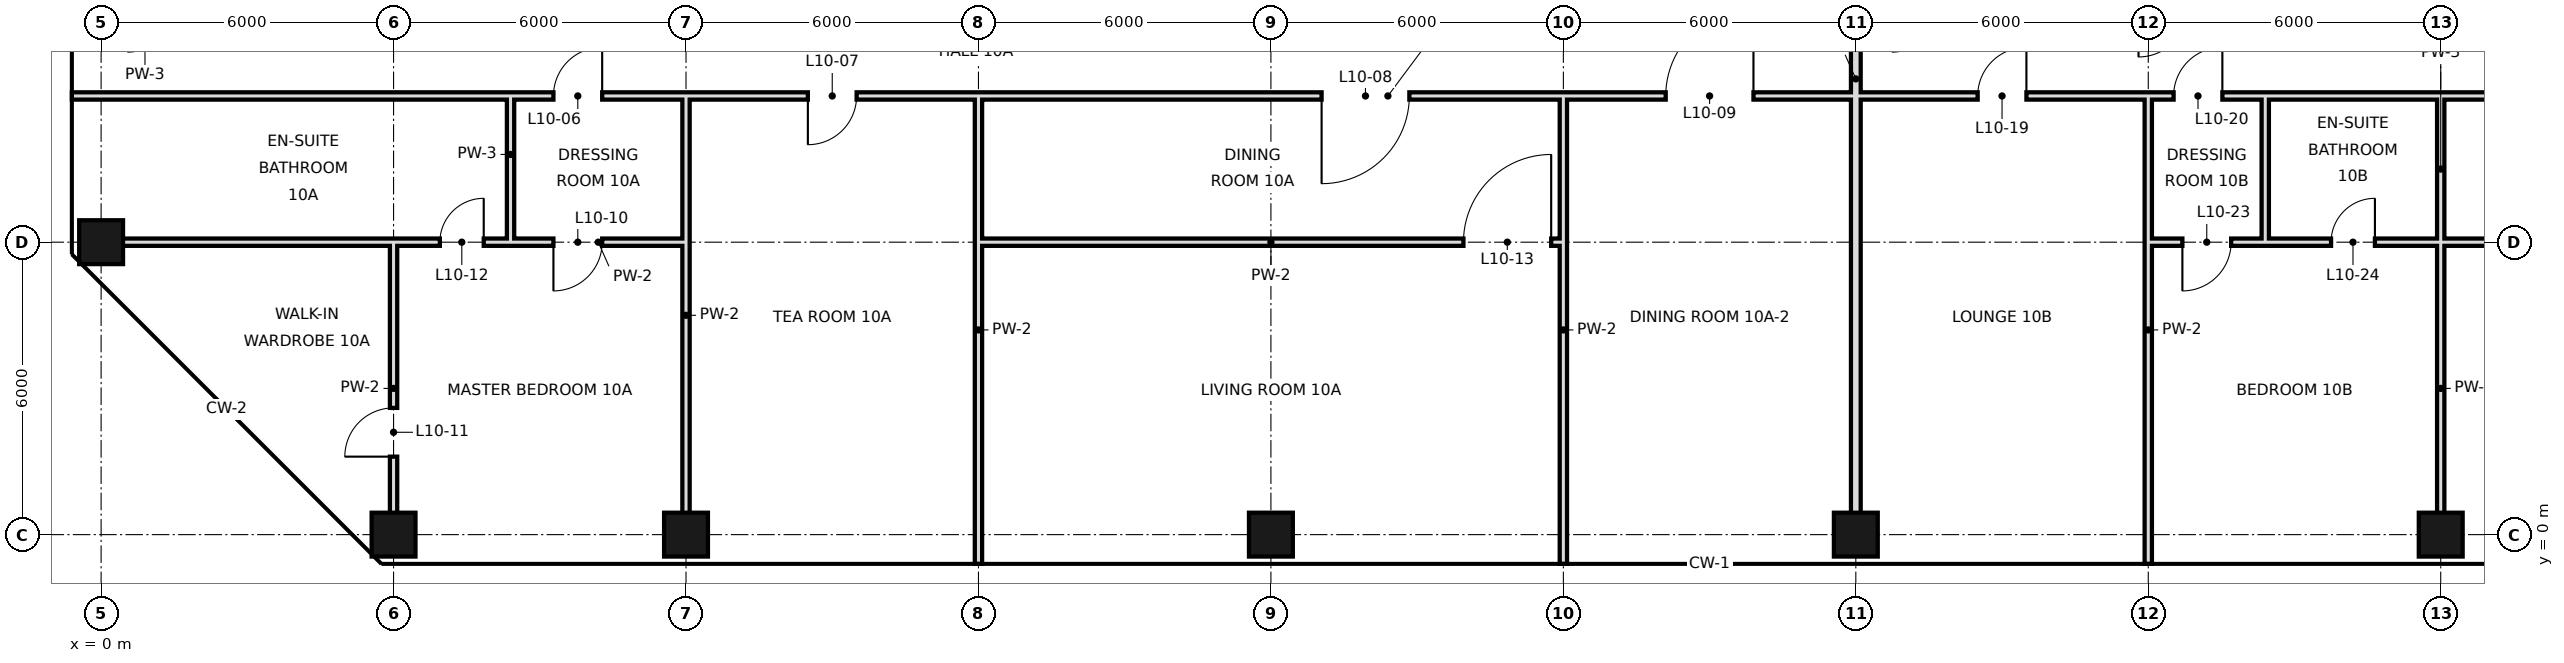
"""IFC4 building model, lengths in metres.
Left out: names, types, materials, properties, quantities, classifications, styles, units other than length and angle.
Written with IfcOpenShell. Run it as: python <this file> out.ifc"""

import sys

from ifc_helpers import new_model, si_unit, direction, frame, frame_2d, origin, origin_2d, place, context, subcontext, project, spatial, rectangle, hollow_rectangle, extrude, element, fill, save


model = new_model("IFC4")
c1 = context("Model", 3, precision=1e-05, world=origin(), true_north=direction((0.0, 1.0)))
c2 = subcontext(c1, "Body", "Model", "MODEL_VIEW")
j1 = project(units=[si_unit("LENGTHUNIT", "METRE"), si_unit("PLANEANGLEUNIT", "RADIAN")], contexts=[c1])
p1 = place(None, origin())
s1 = spatial("IfcSite", under=j1, at=p1, CompositionType="ELEMENT")
p2 = place(p1, origin())
s2 = spatial("IfcBuilding", under=s1, at=p2, CompositionType="ELEMENT")
p3 = place(p2, frame((0.0, 0.0, 57.0)))
s3 = spatial("IfcBuildingStorey", under=s2, at=p3, CompositionType="ELEMENT", Elevation=57.0)
for number, where, z_axis, x_axis in (
    (1, (0.0, 6.0, 0.0), (0.0, 0.0, 1.0), (1.0, 0.0, 0.0)),
    (2, (6.0, 0.0, 0.0), (0.0, 0.0, 1.0), (1.0, 0.0, 0.0)),
    (3, (12.0, 0.0, 0.0), (0.0, 0.0, 1.0), (1.0, 0.0, 0.0)),
    (4, (24.0, 0.0, 0.0), (0.0, 0.0, 1.0), (1.0, 0.0, 0.0)),
    (5, (36.0, 0.0, 0.0), (0.0, 0.0, 1.0), (1.0, 0.0, 0.0)),
    (6, (48.0, 0.0, 0.0), (0.0, 0.0, 1.0), (1.0, 0.0, 0.0)),
):
    element("IfcColumn", number, at=place(p3, frame(where, z_axis=z_axis, x_axis=x_axis)), inside=s3, PredefinedType="COLUMN", context=c2, shape_type="SweptSolid", body=[
        extrude(hollow_rectangle(XDim=0.9, YDim=0.9, WallThickness=0.045, at=origin_2d()), origin(), (0.0, 0.0, 1.0), 3.6),
    ])
p4 = place(p3, frame((12.0, 0.0, 0.0), z_axis=(0.0, 0.0, 1.0), x_axis=(0.0, 1.0, 0.0)))
e7 = element("IfcWall", 7, at=p4, inside=s3, PredefinedType="PARTITIONING", context=c2, shape_type="SweptSolid", body=[
    extrude(rectangle(XDim=9.0, YDim=0.15, at=frame_2d((4.5, 0.0))), origin(), (0.0, 0.0, 1.0), 2.72),
])
p5 = place(p3, frame((18.0, -0.6, 0.0), z_axis=(0.0, 0.0, 1.0), x_axis=(0.0, 1.0, 0.0)))
e8 = element("IfcWall", 8, at=p5, inside=s3, PredefinedType="PARTITIONING", context=c2, shape_type="SweptSolid", body=[
    extrude(rectangle(XDim=9.6, YDim=0.15, at=frame_2d((4.8, 0.0))), origin(), (0.0, 0.0, 1.0), 3.42),
])
p6 = place(p3, frame((30.0, -0.6, 0.0), z_axis=(0.0, 0.0, 1.0), x_axis=(0.0, 1.0, 0.0)))
e9 = element("IfcWall", 9, at=p6, inside=s3, PredefinedType="PARTITIONING", context=c2, shape_type="SweptSolid", body=[
    extrude(rectangle(XDim=9.6, YDim=0.15, at=frame_2d((4.8, 0.0))), origin(), (0.0, 0.0, 1.0), 2.72),
])
p7 = place(p3, frame((36.0, 0.0, 0.0), z_axis=(0.0, 0.0, 1.0), x_axis=(0.0, 1.0, 0.0)))
e10 = element("IfcWall", 10, at=p7, inside=s3, PredefinedType="SOLIDWALL", context=c2, shape_type="SweptSolid", body=[
    extrude(rectangle(XDim=18.7, YDim=0.2, at=frame_2d((9.35, 0.0))), origin(), (0.0, 0.0, 1.0), 2.72),
])
p8 = place(p3, frame((42.0, -0.6, 0.0), z_axis=(0.0, 0.0, 1.0), x_axis=(0.0, 1.0, 0.0)))
e11 = element("IfcWall", 11, at=p8, inside=s3, PredefinedType="PARTITIONING", context=c2, shape_type="SweptSolid", body=[
    extrude(rectangle(XDim=9.6, YDim=0.15, at=frame_2d((4.8, 0.0))), origin(), (0.0, 0.0, 1.0), 2.72),
])
p9 = place(p3, frame((44.4, 6.0, 0.0), z_axis=(0.0, 0.0, 1.0), x_axis=(0.0, 1.0, 0.0)))
e12 = element("IfcWall", 12, at=p9, inside=s3, PredefinedType="PARTITIONING", context=c2, shape_type="SweptSolid", body=[
    extrude(rectangle(XDim=3.0, YDim=0.15, at=frame_2d((1.5, 0.0))), origin(), (0.0, 0.0, 1.0), 3.42),
])
p10 = place(p3, frame((48.0, 0.0, 0.0), z_axis=(0.0, 0.0, 1.0), x_axis=(0.0, 1.0, 0.0)))
e13 = element("IfcWall", 13, at=p10, inside=s3, PredefinedType="PARTITIONING", context=c2, shape_type="SweptSolid", body=[
    extrude(rectangle(XDim=6.0, YDim=0.15, at=frame_2d((3.0, 0.0))), origin(), (0.0, 0.0, 1.0), 2.72),
])
p11 = place(p3, frame((48.0, 6.0, 0.0), z_axis=(0.0, 0.0, 1.0), x_axis=(0.0, 1.0, 0.0)))
e14 = element("IfcWall", 14, at=p11, inside=s3, PredefinedType="PARTITIONING", context=c2, shape_type="SweptSolid", body=[
    extrude(rectangle(XDim=3.0, YDim=0.15, at=frame_2d((1.5, 0.0))), origin(), (0.0, 0.0, 1.0), 2.72),
])
p12 = place(p3, frame((6.0, 0.0, 0.0), z_axis=(0.0, 0.0, 1.0), x_axis=(0.0, 1.0, 0.0)))
e15 = element("IfcWall", 15, at=p12, inside=s3, PredefinedType="PARTITIONING", context=c2, shape_type="SweptSolid", body=[
    extrude(rectangle(XDim=6.0, YDim=0.15, at=frame_2d((3.0, 0.0))), origin(), (0.0, 0.0, 1.0), 2.72),
])
p13 = place(p12, frame((1.6, 0.0, 0.0)))
e16 = element("IfcOpeningElement", 16, at=p13, cuts=e15, PredefinedType="OPENING", context=c2, shape_type="SweptSolid", body=[
    extrude(rectangle(XDim=1.0, YDim=2.4, at=frame_2d((0.5, 1.2))), frame((0.0, 0.085, 0.0), z_axis=(0.0, -1.0, 0.0), x_axis=(1.0, 0.0, 0.0)), (0.0, 0.0, 1.0), 0.17),
])
p14 = place(p3, frame((8.4, 6.0, 0.0), z_axis=(0.0, 0.0, 1.0), x_axis=(0.0, 1.0, 0.0)))
e17 = element("IfcWall", 17, at=p14, inside=s3, PredefinedType="PARTITIONING", context=c2, shape_type="SweptSolid", body=[
    extrude(rectangle(XDim=3.0, YDim=0.15, at=frame_2d((1.5, 0.0))), origin(), (0.0, 0.0, 1.0), 3.42),
])
p15 = place(p3, frame((8.4, 6.0, 0.0), z_axis=(0.0, 0.0, 1.0), x_axis=(1.0, 0.0, 0.0)))
e18 = element("IfcWall", 18, at=p15, inside=s3, PredefinedType="PARTITIONING", context=c2, shape_type="SweptSolid", body=[
    extrude(rectangle(XDim=3.6, YDim=0.15, at=frame_2d((1.8, 0.0))), origin(), (0.0, 0.0, 1.0), 2.97),
])
p16 = place(p15, frame((0.88, 0.0, 0.0)))
e19 = element("IfcOpeningElement", 19, at=p16, cuts=e18, PredefinedType="OPENING", context=c2, shape_type="SweptSolid", body=[
    extrude(rectangle(XDim=1.0, YDim=2.4, at=frame_2d((0.5, 1.2))), frame((0.0, 0.085, 0.0), z_axis=(0.0, -1.0, 0.0), x_axis=(1.0, 0.0, 0.0)), (0.0, 0.0, 1.0), 0.17),
])
p17 = place(p3, frame((18.0, 6.0, 0.0), z_axis=(0.0, 0.0, 1.0), x_axis=(1.0, 0.0, 0.0)))
e20 = element("IfcWall", 20, at=p17, inside=s3, PredefinedType="PARTITIONING", context=c2, shape_type="SweptSolid", body=[
    extrude(rectangle(XDim=12.0, YDim=0.15, at=frame_2d((6.0, 0.0))), origin(), (0.0, 0.0, 1.0), 2.72),
])
p18 = place(p17, frame((9.95, 0.0, 0.0)))
e21 = element("IfcOpeningElement", 21, at=p18, cuts=e20, PredefinedType="OPENING", context=c2, shape_type="SweptSolid", body=[
    extrude(rectangle(XDim=1.8, YDim=2.4, at=frame_2d((0.9, 1.2))), frame((0.0, 0.085, 0.0), z_axis=(0.0, -1.0, 0.0), x_axis=(1.0, 0.0, 0.0)), (0.0, 0.0, 1.0), 0.17),
])
p19 = place(p3, frame((42.0, 6.0, 0.0), z_axis=(0.0, 0.0, 1.0), x_axis=(1.0, 0.0, 0.0)))
e22 = element("IfcWall", 22, at=p19, inside=s3, PredefinedType="PARTITIONING", context=c2, shape_type="SweptSolid", body=[
    extrude(rectangle(XDim=2.4, YDim=0.15, at=frame_2d((1.2, 0.0))), origin(), (0.0, 0.0, 1.0), 2.97),
])
p20 = place(p19, frame((0.7, 0.0, 0.0)))
e23 = element("IfcOpeningElement", 23, at=p20, cuts=e22, PredefinedType="OPENING", context=c2, shape_type="SweptSolid", body=[
    extrude(rectangle(XDim=1.0, YDim=2.4, at=frame_2d((0.5, 1.2))), frame((0.0, 0.085, 0.0), z_axis=(0.0, -1.0, 0.0), x_axis=(1.0, 0.0, 0.0)), (0.0, 0.0, 1.0), 0.17),
])
p21 = place(p3, frame((0.0, 6.0, 0.0), z_axis=(0.0, 0.0, 1.0), x_axis=(1.0, 0.0, 0.0)))
e24 = element("IfcWall", 24, at=p21, inside=s3, PredefinedType="PARTITIONING", context=c2, shape_type="SweptSolid", body=[
    extrude(rectangle(XDim=8.4, YDim=0.15, at=frame_2d((4.2, 0.0))), origin(), (0.0, 0.0, 1.0), 2.97),
])
p22 = place(p21, frame((6.95, 0.0, 0.0)))
e25 = element("IfcOpeningElement", 25, at=p22, cuts=e24, PredefinedType="OPENING", context=c2, shape_type="SweptSolid", body=[
    extrude(rectangle(XDim=0.9, YDim=2.4, at=frame_2d((0.45, 1.2))), frame((0.0, 0.085, 0.0), z_axis=(0.0, -1.0, 0.0), x_axis=(1.0, 0.0, 0.0)), (0.0, 0.0, 1.0), 0.17),
])
p23 = place(p3, frame((44.4, 6.0, 0.0), z_axis=(0.0, 0.0, 1.0), x_axis=(1.0, 0.0, 0.0)))
e26 = element("IfcWall", 26, at=p23, inside=s3, PredefinedType="PARTITIONING", context=c2, shape_type="SweptSolid", body=[
    extrude(rectangle(XDim=7.2, YDim=0.15, at=frame_2d((3.6, 0.0))), origin(), (0.0, 0.0, 1.0), 2.52),
])
p24 = place(p23, frame((1.35, 0.0, 0.0)))
e27 = element("IfcOpeningElement", 27, at=p24, cuts=e26, PredefinedType="OPENING", context=c2, shape_type="SweptSolid", body=[
    extrude(rectangle(XDim=0.9, YDim=2.4, at=frame_2d((0.45, 1.2))), frame((0.0, 0.085, 0.0), z_axis=(0.0, -1.0, 0.0), x_axis=(1.0, 0.0, 0.0)), (0.0, 0.0, 1.0), 0.17),
])
p25 = place(p23, frame((4.95, 0.0, 0.0)))
e28 = element("IfcOpeningElement", 28, at=p25, cuts=e26, PredefinedType="OPENING", context=c2, shape_type="SweptSolid", body=[
    extrude(rectangle(XDim=0.9, YDim=2.4, at=frame_2d((0.45, 1.2))), frame((0.0, 0.085, 0.0), z_axis=(0.0, -1.0, 0.0), x_axis=(1.0, 0.0, 0.0)), (0.0, 0.0, 1.0), 0.17),
])
p26 = place(p3, frame((8.4, 9.0, 0.0), z_axis=(0.0, 0.0, 1.0), x_axis=(1.0, 0.0, 0.0)))
e29 = element("IfcWall", 29, at=p26, inside=s3, PredefinedType="PARTITIONING", context=c2, shape_type="SweptSolid", body=[
    extrude(rectangle(XDim=36.0, YDim=0.15, at=frame_2d((18.0, 0.0))), origin(), (0.0, 0.0, 1.0), 3.42),
])
p27 = place(p26, frame((0.88, 0.0, 0.0)))
e30 = element("IfcOpeningElement", 30, at=p27, cuts=e29, PredefinedType="OPENING", context=c2, shape_type="SweptSolid", body=[
    extrude(rectangle(XDim=1.0, YDim=2.4, at=frame_2d((0.5, 1.2))), frame((0.0, 0.085, 0.0), z_axis=(0.0, -1.0, 0.0), x_axis=(1.0, 0.0, 0.0)), (0.0, 0.0, 1.0), 0.17),
])
p28 = place(p26, frame((6.1, 0.0, 0.0)))
e31 = element("IfcOpeningElement", 31, at=p28, cuts=e29, PredefinedType="OPENING", context=c2, shape_type="SweptSolid", body=[
    extrude(rectangle(XDim=1.0, YDim=2.4, at=frame_2d((0.5, 1.2))), frame((0.0, 0.085, 0.0), z_axis=(0.0, -1.0, 0.0), x_axis=(1.0, 0.0, 0.0)), (0.0, 0.0, 1.0), 0.17),
])
p29 = place(p26, frame((16.64, 0.0, 0.0)))
e32 = element("IfcOpeningElement", 32, at=p29, cuts=e29, PredefinedType="OPENING", context=c2, shape_type="SweptSolid", body=[
    extrude(rectangle(XDim=1.8, YDim=2.4, at=frame_2d((0.9, 1.2))), frame((0.0, 0.085, 0.0), z_axis=(0.0, -1.0, 0.0), x_axis=(1.0, 0.0, 0.0)), (0.0, 0.0, 1.0), 0.17),
])
p30 = place(p26, frame((23.7, 0.0, 0.0)))
e33 = element("IfcOpeningElement", 33, at=p30, cuts=e29, PredefinedType="OPENING", context=c2, shape_type="SweptSolid", body=[
    extrude(rectangle(XDim=1.8, YDim=2.4, at=frame_2d((0.9, 1.2))), frame((0.0, 0.085, 0.0), z_axis=(0.0, -1.0, 0.0), x_axis=(1.0, 0.0, 0.0)), (0.0, 0.0, 1.0), 0.17),
])
p31 = place(p26, frame((30.1, 0.0, 0.0)))
e34 = element("IfcOpeningElement", 34, at=p31, cuts=e29, PredefinedType="OPENING", context=c2, shape_type="SweptSolid", body=[
    extrude(rectangle(XDim=1.0, YDim=2.4, at=frame_2d((0.5, 1.2))), frame((0.0, 0.085, 0.0), z_axis=(0.0, -1.0, 0.0), x_axis=(1.0, 0.0, 0.0)), (0.0, 0.0, 1.0), 0.17),
])
p32 = place(p26, frame((34.12, 0.0, 0.0)))
e35 = element("IfcOpeningElement", 35, at=p32, cuts=e29, PredefinedType="OPENING", context=c2, shape_type="SweptSolid", body=[
    extrude(rectangle(XDim=1.0, YDim=2.4, at=frame_2d((0.5, 1.2))), frame((0.0, 0.085, 0.0), z_axis=(0.0, -1.0, 0.0), x_axis=(1.0, 0.0, 0.0)), (0.0, 0.0, 1.0), 0.17),
])
p33 = place(p3, frame((-0.6, 9.0, 0.0), z_axis=(0.0, 0.0, 1.0), x_axis=(1.0, 0.0, 0.0)))
e36 = element("IfcWall", 36, at=p33, inside=s3, PredefinedType="PARTITIONING", context=c2, shape_type="SweptSolid", body=[
    extrude(rectangle(XDim=9.0, YDim=0.15, at=frame_2d((4.5, 0.0))), origin(), (0.0, 0.0, 1.0), 3.42),
])
p34 = place(p3, frame((44.4, 9.0, 0.0), z_axis=(0.0, 0.0, 1.0), x_axis=(1.0, 0.0, 0.0)))
e37 = element("IfcWall", 37, at=p34, inside=s3, PredefinedType="PARTITIONING", context=c2, shape_type="SweptSolid", body=[
    extrude(rectangle(XDim=7.2, YDim=0.15, at=frame_2d((3.6, 0.0))), origin(), (0.0, 0.0, 1.0), 3.42),
])
p35 = place(p27, frame((1.0, 0.0, 0.0), z_axis=(0.0, 0.0, 1.0), x_axis=(-1.0, 0.0, 0.0)))
e38 = element("IfcDoor", 38, at=p35, inside=s3, OperationType="SINGLE_SWING_LEFT", PredefinedType="DOOR", context=c2, shape_type="SweptSolid", body=[
    extrude(rectangle(XDim=1.0, YDim=2.4, at=frame_2d((0.5, 1.2))), frame((0.0, 0.025, 0.0), z_axis=(0.0, -1.0, 0.0), x_axis=(1.0, 0.0, 0.0)), (0.0, 0.0, 1.0), 0.05),
])
fill(e30, e38)
p36 = place(p28, frame((1.0, 0.0, 0.0), z_axis=(0.0, 0.0, 1.0), x_axis=(-1.0, 0.0, 0.0)))
e39 = element("IfcDoor", 39, at=p36, inside=s3, OperationType="SINGLE_SWING_RIGHT", PredefinedType="DOOR", context=c2, shape_type="SweptSolid", body=[
    extrude(rectangle(XDim=1.0, YDim=2.4, at=frame_2d((0.5, 1.2))), frame((0.0, 0.025, 0.0), z_axis=(0.0, -1.0, 0.0), x_axis=(1.0, 0.0, 0.0)), (0.0, 0.0, 1.0), 0.05),
])
fill(e31, e39)
p37 = place(p29, frame((1.8, 0.0, 0.0), z_axis=(0.0, 0.0, 1.0), x_axis=(-1.0, 0.0, 0.0)))
e40 = element("IfcDoor", 40, at=p37, inside=s3, OperationType="SINGLE_SWING_RIGHT", PredefinedType="DOOR", context=c2, shape_type="SweptSolid", body=[
    extrude(rectangle(XDim=1.8, YDim=2.4, at=frame_2d((0.9, 1.2))), frame((0.0, 0.025, 0.0), z_axis=(0.0, -1.0, 0.0), x_axis=(1.0, 0.0, 0.0)), (0.0, 0.0, 1.0), 0.05),
])
fill(e32, e40)
p38 = place(p30, frame((1.8, 0.0, 0.0), z_axis=(0.0, 0.0, 1.0), x_axis=(-1.0, 0.0, 0.0)))
e41 = element("IfcDoor", 41, at=p38, inside=s3, OperationType="SINGLE_SWING_LEFT", PredefinedType="DOOR", context=c2, shape_type="SweptSolid", body=[
    extrude(rectangle(XDim=1.8, YDim=2.4, at=frame_2d((0.9, 1.2))), frame((0.0, 0.025, 0.0), z_axis=(0.0, -1.0, 0.0), x_axis=(1.0, 0.0, 0.0)), (0.0, 0.0, 1.0), 0.05),
])
fill(e33, e41)
p39 = place(p16, frame((1.0, 0.0, 0.0), z_axis=(0.0, 0.0, 1.0), x_axis=(-1.0, 0.0, 0.0)))
e42 = element("IfcDoor", 42, at=p39, inside=s3, OperationType="SINGLE_SWING_RIGHT", PredefinedType="DOOR", context=c2, shape_type="SweptSolid", body=[
    extrude(rectangle(XDim=1.0, YDim=2.4, at=frame_2d((0.5, 1.2))), frame((0.0, 0.025, 0.0), z_axis=(0.0, -1.0, 0.0), x_axis=(1.0, 0.0, 0.0)), (0.0, 0.0, 1.0), 0.05),
])
fill(e19, e42)
p40 = place(p13, origin())
e43 = element("IfcDoor", 43, at=p40, inside=s3, OperationType="SINGLE_SWING_LEFT", PredefinedType="DOOR", context=c2, shape_type="SweptSolid", body=[
    extrude(rectangle(XDim=1.0, YDim=2.4, at=frame_2d((0.5, 1.2))), frame((0.0, 0.025, 0.0), z_axis=(0.0, -1.0, 0.0), x_axis=(1.0, 0.0, 0.0)), (0.0, 0.0, 1.0), 0.05),
])
fill(e16, e43)
p41 = place(p22, frame((0.9, 0.0, 0.0), z_axis=(0.0, 0.0, 1.0), x_axis=(-1.0, 0.0, 0.0)))
e44 = element("IfcDoor", 44, at=p41, inside=s3, OperationType="SINGLE_SWING_LEFT", PredefinedType="DOOR", context=c2, shape_type="SweptSolid", body=[
    extrude(rectangle(XDim=0.9, YDim=2.4, at=frame_2d((0.45, 1.2))), frame((0.0, 0.025, 0.0), z_axis=(0.0, -1.0, 0.0), x_axis=(1.0, 0.0, 0.0)), (0.0, 0.0, 1.0), 0.05),
])
fill(e25, e44)
p42 = place(p18, frame((1.8, 0.0, 0.0), z_axis=(0.0, 0.0, 1.0), x_axis=(-1.0, 0.0, 0.0)))
e45 = element("IfcDoor", 45, at=p42, inside=s3, OperationType="SINGLE_SWING_LEFT", PredefinedType="DOOR", context=c2, shape_type="SweptSolid", body=[
    extrude(rectangle(XDim=1.8, YDim=2.4, at=frame_2d((0.9, 1.2))), frame((0.0, 0.025, 0.0), z_axis=(0.0, -1.0, 0.0), x_axis=(1.0, 0.0, 0.0)), (0.0, 0.0, 1.0), 0.05),
])
fill(e21, e45)
p43 = place(p31, frame((1.0, 0.0, 0.0), z_axis=(0.0, 0.0, 1.0), x_axis=(-1.0, 0.0, 0.0)))
e46 = element("IfcDoor", 46, at=p43, inside=s3, OperationType="SINGLE_SWING_LEFT", PredefinedType="DOOR", context=c2, shape_type="SweptSolid", body=[
    extrude(rectangle(XDim=1.0, YDim=2.4, at=frame_2d((0.5, 1.2))), frame((0.0, 0.025, 0.0), z_axis=(0.0, -1.0, 0.0), x_axis=(1.0, 0.0, 0.0)), (0.0, 0.0, 1.0), 0.05),
])
fill(e34, e46)
p44 = place(p32, frame((1.0, 0.0, 0.0), z_axis=(0.0, 0.0, 1.0), x_axis=(-1.0, 0.0, 0.0)))
e47 = element("IfcDoor", 47, at=p44, inside=s3, OperationType="SINGLE_SWING_LEFT", PredefinedType="DOOR", context=c2, shape_type="SweptSolid", body=[
    extrude(rectangle(XDim=1.0, YDim=2.4, at=frame_2d((0.5, 1.2))), frame((0.0, 0.025, 0.0), z_axis=(0.0, -1.0, 0.0), x_axis=(1.0, 0.0, 0.0)), (0.0, 0.0, 1.0), 0.05),
])
fill(e35, e47)
p45 = place(p20, frame((1.0, 0.0, 0.0), z_axis=(0.0, 0.0, 1.0), x_axis=(-1.0, 0.0, 0.0)))
e48 = element("IfcDoor", 48, at=p45, inside=s3, OperationType="SINGLE_SWING_RIGHT", PredefinedType="DOOR", context=c2, shape_type="SweptSolid", body=[
    extrude(rectangle(XDim=1.0, YDim=2.4, at=frame_2d((0.5, 1.2))), frame((0.0, 0.025, 0.0), z_axis=(0.0, -1.0, 0.0), x_axis=(1.0, 0.0, 0.0)), (0.0, 0.0, 1.0), 0.05),
])
fill(e23, e48)
p46 = place(p24, frame((0.9, 0.0, 0.0), z_axis=(0.0, 0.0, 1.0), x_axis=(-1.0, 0.0, 0.0)))
e49 = element("IfcDoor", 49, at=p46, inside=s3, OperationType="SINGLE_SWING_LEFT", PredefinedType="DOOR", context=c2, shape_type="SweptSolid", body=[
    extrude(rectangle(XDim=0.9, YDim=2.4, at=frame_2d((0.45, 1.2))), frame((0.0, 0.025, 0.0), z_axis=(0.0, -1.0, 0.0), x_axis=(1.0, 0.0, 0.0)), (0.0, 0.0, 1.0), 0.05),
])
fill(e27, e49)
save(model, sys.argv[1])
